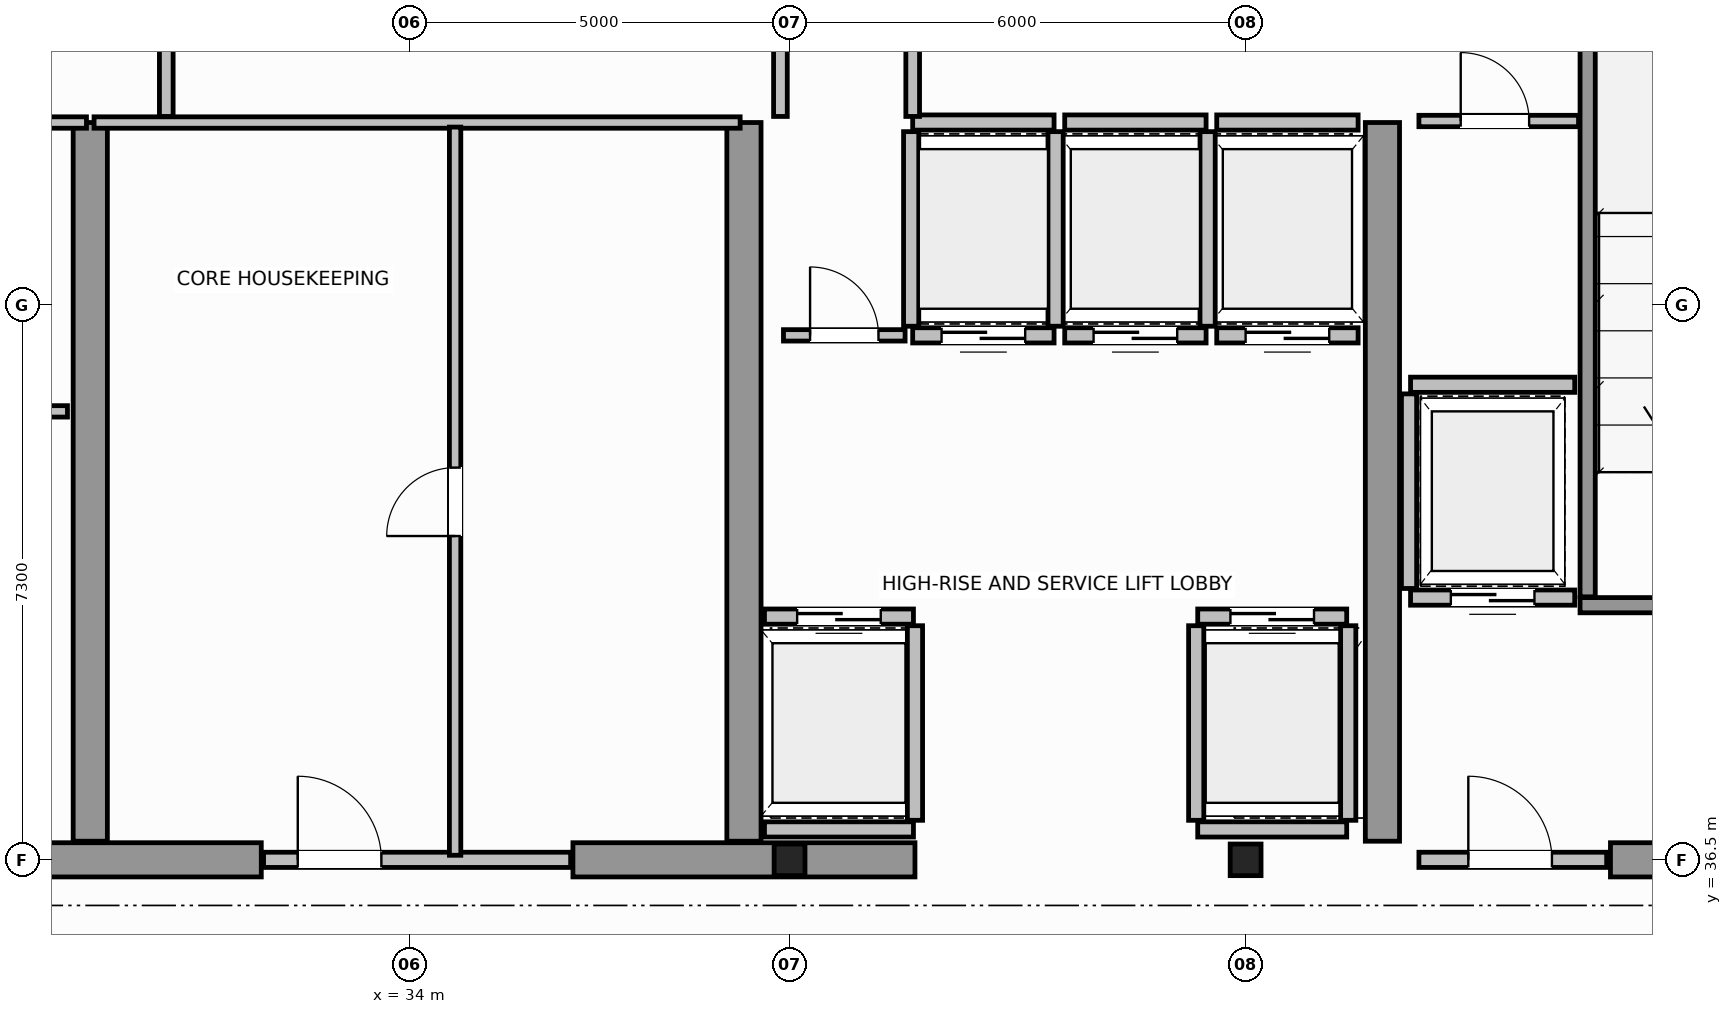
"""IFC4 building model, lengths in metres.
Left out: names, types, materials, properties, quantities, classifications, styles, units other than length and angle.
Written with IfcOpenShell. Run it as: python <this file> out.ifc"""

import sys

from ifc_helpers import new_model, si_unit, direction, frame, frame_2d, origin, origin_2d, place, context, subcontext, project, spatial, rectangle, i_section, extrude, source, transform, mapped, element, fill, save


model = new_model("IFC4")
c1 = context("Model", 3, precision=1e-05, world=origin(), true_north=direction((0.0, 1.0)))
c2 = subcontext(c1, "Body", "Model", "MODEL_VIEW")
j1 = project(units=[si_unit("LENGTHUNIT", "METRE"), si_unit("PLANEANGLEUNIT", "RADIAN")], contexts=[c1])
p1 = place(None, origin())
s1 = spatial("IfcSite", under=j1, at=p1, CompositionType="ELEMENT")
p2 = place(p1, origin())
s2 = spatial("IfcBuilding", under=s1, at=p2, CompositionType="ELEMENT")
p3 = place(p2, frame((0.0, 0.0, 291.6)))
s3 = spatial("IfcBuildingStorey", under=s2, at=p3, CompositionType="ELEMENT", Elevation=291.6)
m1 = source(origin(), c2, "Body", "SweptSolid", [
    extrude(i_section(OverallWidth=0.406, OverallDepth=0.416, WebThickness=0.03, FlangeThickness=0.042, FilletRadius=0.015, at=origin_2d()), origin(), (0.0, 0.0, 1.0), 3.8),
])
for number, where, z_axis, x_axis in (
    (1, (39.0, 36.5, 0.0), (0.0, 0.0, 1.0), (1.0, 0.0, 0.0)),
    (2, (45.0, 36.5, 0.0), (0.0, 0.0, 1.0), (1.0, 0.0, 0.0)),
):
    element("IfcColumn", number, at=place(p3, frame(where, z_axis=z_axis, x_axis=x_axis)), inside=s3, PredefinedType="COLUMN", context=c2, shape_type="MappedRepresentation", body=[
        mapped(m1, transform((0.0, 0.0, 0.0), scale=1.0)),
    ])
for number, where, z_axis, x_axis in (
    (3, (27.55, 36.5, 0.0), (0.0, 0.0, 1.0), (1.0, 0.0, 0.0)),
    (4, (36.15, 36.5, 0.0), (0.0, 0.0, 1.0), (1.0, 0.0, 0.0)),
):
    element("IfcWall", number, at=place(p3, frame(where, z_axis=z_axis, x_axis=x_axis)), inside=s3, PredefinedType="SHEAR", context=c2, shape_type="SweptSolid", body=[
        extrude(rectangle(XDim=4.5, YDim=0.45, at=frame_2d((2.25, 0.0))), origin(), (0.0, 0.0, 1.0), 3.8),
    ])
p4 = place(p3, frame((49.8, 36.5, 0.0), z_axis=(0.0, 0.0, 1.0), x_axis=(1.0, 0.0, 0.0)))
e5 = element("IfcWall", 5, at=p4, inside=s3, PredefinedType="SHEAR", context=c2, shape_type="SweptSolid", body=[
    extrude(rectangle(XDim=3.955, YDim=0.45, at=frame_2d((1.978, 0.0))), origin(), (0.0, 0.0, 1.0), 2.58),
])
for number, where, z_axis, x_axis in (
    (6, (29.8, 36.745, 0.0), (0.0, 0.0, 1.0), (0.0, 1.0, 0.0)),
    (7, (38.4, 36.745, 0.0), (0.0, 0.0, 1.0), (0.0, 1.0, 0.0)),
    (8, (46.8, 36.745, 0.0), (0.0, 0.0, 1.0), (0.0, 1.0, 0.0)),
):
    element("IfcWall", number, at=place(p3, frame(where, z_axis=z_axis, x_axis=x_axis)), inside=s3, PredefinedType="SHEAR", context=c2, shape_type="SweptSolid", body=[
        extrude(rectangle(XDim=9.455, YDim=0.45, at=frame_2d((4.728, 0.0))), origin(), (0.0, 0.0, 1.0), 3.8),
    ])
p5 = place(p3, frame((49.4, 39.85, 0.0), z_axis=(0.0, 0.0, 1.0), x_axis=(1.0, 0.0, 0.0)))
e9 = element("IfcWall", 9, at=p5, inside=s3, PredefinedType="SOLIDWALL", context=c2, shape_type="SweptSolid", body=[
    extrude(rectangle(XDim=4.375, YDim=0.2, at=frame_2d((2.188, 0.0))), origin(), (0.0, 0.0, 1.0), 3.8),
])
p6 = place(p5, frame((1.325, 0.0, 0.0)))
e10 = element("IfcOpeningElement", 10, at=p6, cuts=e9, PredefinedType="OPENING", context=c2, shape_type="SweptSolid", body=[
    extrude(rectangle(XDim=1.1, YDim=2.15, at=frame_2d((0.55, 1.075))), frame((0.0, 0.11, 0.0), z_axis=(0.0, -1.0, 0.0), x_axis=(1.0, 0.0, 0.0)), (0.0, 0.0, 1.0), 0.22),
])
p7 = place(p3, frame((49.5, 39.96, 0.0), z_axis=(0.0, 0.0, 1.0), x_axis=(0.0, 1.0, 0.0)))
e11 = element("IfcWall", 11, at=p7, inside=s3, PredefinedType="SOLIDWALL", context=c2, shape_type="SweptSolid", body=[
    extrude(rectangle(XDim=9.93, YDim=0.2, at=frame_2d((4.965, 0.0))), origin(), (0.0, 0.0, 1.0), 3.8),
])
p8 = place(p3, frame((47.28, 36.5, 0.0), z_axis=(0.0, 0.0, 1.0), x_axis=(1.0, 0.0, 0.0)))
e12 = element("IfcWall", 12, at=p8, inside=s3, PredefinedType="SOLIDWALL", context=c2, shape_type="SweptSolid", body=[
    extrude(rectangle(XDim=2.47, YDim=0.2, at=frame_2d((1.235, 0.0))), origin(), (0.0, 0.0, 1.0), 2.57),
])
p9 = place(p8, frame((0.65, 0.0, 0.0)))
e13 = element("IfcOpeningElement", 13, at=p9, cuts=e12, PredefinedType="OPENING", context=c2, shape_type="SweptSolid", body=[
    extrude(rectangle(XDim=1.1, YDim=2.15, at=frame_2d((0.55, 1.075))), frame((0.0, 0.11, 0.0), z_axis=(0.0, -1.0, 0.0), x_axis=(1.0, 0.0, 0.0)), (0.0, 0.0, 1.0), 0.22),
])
p10 = place(p3, frame((38.67, 39.7, 0.0), z_axis=(0.0, 0.0, 1.0), x_axis=(1.0, 0.0, 0.0)))
e14 = element("IfcWall", 14, at=p10, inside=s3, PredefinedType="SOLIDWALL", context=c2, shape_type="SweptSolid", body=[
    extrude(rectangle(XDim=1.96, YDim=0.2, at=frame_2d((0.98, 0.0))), origin(), (0.0, 0.0, 1.0), 3.58),
])
p11 = place(p10, frame((0.43, 0.0, 0.0)))
e15 = element("IfcOpeningElement", 15, at=p11, cuts=e14, PredefinedType="OPENING", context=c2, shape_type="SweptSolid", body=[
    extrude(rectangle(XDim=1.1, YDim=2.15, at=frame_2d((0.55, 1.075))), frame((0.0, 0.11, 0.0), z_axis=(0.0, -1.0, 0.0), x_axis=(1.0, 0.0, 0.0)), (0.0, 0.0, 1.0), 0.22),
])
p12 = place(p3, frame((38.67, 36.9, 0.0), z_axis=(0.0, 0.0, 1.0), x_axis=(1.0, 0.0, 0.0)))
e16 = element("IfcWall", 16, at=p12, inside=s3, PredefinedType="SOLIDWALL", context=c2, shape_type="SweptSolid", body=[
    extrude(rectangle(XDim=1.96, YDim=0.2, at=frame_2d((0.98, 0.0))), origin(), (0.0, 0.0, 1.0), 3.58),
])
p13 = place(p3, frame((40.65, 37.02, 0.0), z_axis=(0.0, 0.0, 1.0), x_axis=(0.0, 1.0, 0.0)))
e17 = element("IfcWall", 17, at=p13, inside=s3, PredefinedType="SOLIDWALL", context=c2, shape_type="SweptSolid", body=[
    extrude(rectangle(XDim=2.56, YDim=0.2, at=frame_2d((1.28, 0.0))), origin(), (0.0, 0.0, 1.0), 3.58),
])
p14 = place(p3, frame((44.37, 39.7, 0.0), z_axis=(0.0, 0.0, 1.0), x_axis=(1.0, 0.0, 0.0)))
e18 = element("IfcWall", 18, at=p14, inside=s3, PredefinedType="SOLIDWALL", context=c2, shape_type="SweptSolid", body=[
    extrude(rectangle(XDim=1.96, YDim=0.2, at=frame_2d((0.98, 0.0))), origin(), (0.0, 0.0, 1.0), 3.58),
])
p15 = place(p14, frame((0.43, 0.0, 0.0)))
e19 = element("IfcOpeningElement", 19, at=p15, cuts=e18, PredefinedType="OPENING", context=c2, shape_type="SweptSolid", body=[
    extrude(rectangle(XDim=1.1, YDim=2.15, at=frame_2d((0.55, 1.075))), frame((0.0, 0.11, 0.0), z_axis=(0.0, -1.0, 0.0), x_axis=(1.0, 0.0, 0.0)), (0.0, 0.0, 1.0), 0.22),
])
p16 = place(p3, frame((44.37, 36.9, 0.0), z_axis=(0.0, 0.0, 1.0), x_axis=(1.0, 0.0, 0.0)))
e20 = element("IfcWall", 20, at=p16, inside=s3, PredefinedType="SOLIDWALL", context=c2, shape_type="SweptSolid", body=[
    extrude(rectangle(XDim=1.96, YDim=0.2, at=frame_2d((0.98, 0.0))), origin(), (0.0, 0.0, 1.0), 2.57),
])
for number, where, z_axis, x_axis in (
    (21, (44.35, 37.02, 0.0), (0.0, 0.0, 1.0), (0.0, 1.0, 0.0)),
    (22, (46.35, 37.02, 0.0), (0.0, 0.0, 1.0), (0.0, 1.0, 0.0)),
):
    element("IfcWall", number, at=place(p3, frame(where, z_axis=z_axis, x_axis=x_axis)), inside=s3, PredefinedType="SOLIDWALL", context=c2, shape_type="SweptSolid", body=[
        extrude(rectangle(XDim=2.56, YDim=0.2, at=frame_2d((1.28, 0.0))), origin(), (0.0, 0.0, 1.0), 3.58),
    ])
p17 = place(p3, frame((40.62, 43.4, 0.0), z_axis=(0.0, 0.0, 1.0), x_axis=(1.0, 0.0, 0.0)))
e23 = element("IfcWall", 23, at=p17, inside=s3, PredefinedType="SOLIDWALL", context=c2, shape_type="SweptSolid", body=[
    extrude(rectangle(XDim=1.86, YDim=0.2, at=frame_2d((0.93, 0.0))), origin(), (0.0, 0.0, 1.0), 3.58),
])
p18 = place(p17, frame((0.38, 0.0, 0.0)))
e24 = element("IfcOpeningElement", 24, at=p18, cuts=e23, PredefinedType="OPENING", context=c2, shape_type="SweptSolid", body=[
    extrude(rectangle(XDim=1.1, YDim=2.15, at=frame_2d((0.55, 1.075))), frame((0.0, 0.11, 0.0), z_axis=(0.0, -1.0, 0.0), x_axis=(1.0, 0.0, 0.0)), (0.0, 0.0, 1.0), 0.22),
])
p19 = place(p3, frame((40.62, 46.2, 0.0), z_axis=(0.0, 0.0, 1.0), x_axis=(1.0, 0.0, 0.0)))
e25 = element("IfcWall", 25, at=p19, inside=s3, PredefinedType="SOLIDWALL", context=c2, shape_type="SweptSolid", body=[
    extrude(rectangle(XDim=1.86, YDim=0.2, at=frame_2d((0.93, 0.0))), origin(), (0.0, 0.0, 1.0), 3.58),
])
for number, where, z_axis, x_axis in (
    (26, (40.6, 43.52, 0.0), (0.0, 0.0, 1.0), (0.0, 1.0, 0.0)),
    (27, (42.5, 43.52, 0.0), (0.0, 0.0, 1.0), (0.0, 1.0, 0.0)),
):
    element("IfcWall", number, at=place(p3, frame(where, z_axis=z_axis, x_axis=x_axis)), inside=s3, PredefinedType="SOLIDWALL", context=c2, shape_type="SweptSolid", body=[
        extrude(rectangle(XDim=2.56, YDim=0.2, at=frame_2d((1.28, 0.0))), origin(), (0.0, 0.0, 1.0), 3.58),
    ])
p20 = place(p3, frame((42.62, 43.4, 0.0), z_axis=(0.0, 0.0, 1.0), x_axis=(1.0, 0.0, 0.0)))
e28 = element("IfcWall", 28, at=p20, inside=s3, PredefinedType="SOLIDWALL", context=c2, shape_type="SweptSolid", body=[
    extrude(rectangle(XDim=1.86, YDim=0.2, at=frame_2d((0.93, 0.0))), origin(), (0.0, 0.0, 1.0), 3.58),
])
p21 = place(p20, frame((0.38, 0.0, 0.0)))
e29 = element("IfcOpeningElement", 29, at=p21, cuts=e28, PredefinedType="OPENING", context=c2, shape_type="SweptSolid", body=[
    extrude(rectangle(XDim=1.1, YDim=2.15, at=frame_2d((0.55, 1.075))), frame((0.0, 0.11, 0.0), z_axis=(0.0, -1.0, 0.0), x_axis=(1.0, 0.0, 0.0)), (0.0, 0.0, 1.0), 0.22),
])
p22 = place(p3, frame((42.62, 46.2, 0.0), z_axis=(0.0, 0.0, 1.0), x_axis=(1.0, 0.0, 0.0)))
e30 = element("IfcWall", 30, at=p22, inside=s3, PredefinedType="SOLIDWALL", context=c2, shape_type="SweptSolid", body=[
    extrude(rectangle(XDim=1.86, YDim=0.2, at=frame_2d((0.93, 0.0))), origin(), (0.0, 0.0, 1.0), 3.58),
])
p23 = place(p3, frame((44.5, 43.52, 0.0), z_axis=(0.0, 0.0, 1.0), x_axis=(0.0, 1.0, 0.0)))
e31 = element("IfcWall", 31, at=p23, inside=s3, PredefinedType="SOLIDWALL", context=c2, shape_type="SweptSolid", body=[
    extrude(rectangle(XDim=2.56, YDim=0.2, at=frame_2d((1.28, 0.0))), origin(), (0.0, 0.0, 1.0), 3.58),
])
p24 = place(p3, frame((44.62, 43.4, 0.0), z_axis=(0.0, 0.0, 1.0), x_axis=(1.0, 0.0, 0.0)))
e32 = element("IfcWall", 32, at=p24, inside=s3, PredefinedType="SOLIDWALL", context=c2, shape_type="SweptSolid", body=[
    extrude(rectangle(XDim=1.86, YDim=0.2, at=frame_2d((0.93, 0.0))), origin(), (0.0, 0.0, 1.0), 3.58),
])
p25 = place(p24, frame((0.38, 0.0, 0.0)))
e33 = element("IfcOpeningElement", 33, at=p25, cuts=e32, PredefinedType="OPENING", context=c2, shape_type="SweptSolid", body=[
    extrude(rectangle(XDim=1.1, YDim=2.15, at=frame_2d((0.55, 1.075))), frame((0.0, 0.11, 0.0), z_axis=(0.0, -1.0, 0.0), x_axis=(1.0, 0.0, 0.0)), (0.0, 0.0, 1.0), 0.22),
])
p26 = place(p3, frame((44.62, 46.2, 0.0), z_axis=(0.0, 0.0, 1.0), x_axis=(1.0, 0.0, 0.0)))
e34 = element("IfcWall", 34, at=p26, inside=s3, PredefinedType="SOLIDWALL", context=c2, shape_type="SweptSolid", body=[
    extrude(rectangle(XDim=1.86, YDim=0.2, at=frame_2d((0.93, 0.0))), origin(), (0.0, 0.0, 1.0), 3.58),
])
p27 = place(p3, frame((47.17, 39.95, 0.0), z_axis=(0.0, 0.0, 1.0), x_axis=(1.0, 0.0, 0.0)))
e35 = element("IfcWall", 35, at=p27, inside=s3, PredefinedType="SOLIDWALL", context=c2, shape_type="SweptSolid", body=[
    extrude(rectangle(XDim=2.16, YDim=0.2, at=frame_2d((1.08, 0.0))), origin(), (0.0, 0.0, 1.0), 3.58),
])
p28 = place(p27, frame((0.53, 0.0, 0.0)))
e36 = element("IfcOpeningElement", 36, at=p28, cuts=e35, PredefinedType="OPENING", context=c2, shape_type="SweptSolid", body=[
    extrude(rectangle(XDim=1.1, YDim=2.15, at=frame_2d((0.55, 1.075))), frame((0.0, 0.11, 0.0), z_axis=(0.0, -1.0, 0.0), x_axis=(1.0, 0.0, 0.0)), (0.0, 0.0, 1.0), 0.22),
])
p29 = place(p3, frame((47.17, 42.75, 0.0), z_axis=(0.0, 0.0, 1.0), x_axis=(1.0, 0.0, 0.0)))
e37 = element("IfcWall", 37, at=p29, inside=s3, PredefinedType="SOLIDWALL", context=c2, shape_type="SweptSolid", body=[
    extrude(rectangle(XDim=2.16, YDim=0.2, at=frame_2d((1.08, 0.0))), origin(), (0.0, 0.0, 1.0), 3.58),
])
p30 = place(p3, frame((47.15, 40.07, 0.0), z_axis=(0.0, 0.0, 1.0), x_axis=(0.0, 1.0, 0.0)))
e38 = element("IfcWall", 38, at=p30, inside=s3, PredefinedType="SOLIDWALL", context=c2, shape_type="SweptSolid", body=[
    extrude(rectangle(XDim=2.56, YDim=0.2, at=frame_2d((1.28, 0.0))), origin(), (0.0, 0.0, 1.0), 3.58),
])
p31 = place(p3, frame((21.25, 46.2, 0.0), z_axis=(0.0, 0.0, 1.0), x_axis=(1.0, 0.0, 0.0)))
e39 = element("IfcWall", 39, at=p31, inside=s3, PredefinedType="PARTITIONING", context=c2, shape_type="SweptSolid", body=[
    extrude(rectangle(XDim=8.5, YDim=0.15, at=frame_2d((4.25, 0.0))), origin(), (0.0, 0.0, 1.0), 3.58),
])
p32 = place(p3, frame((21.5, 42.4, 0.0), z_axis=(0.0, 0.0, 1.0), x_axis=(1.0, 0.0, 0.0)))
e40 = element("IfcWall", 40, at=p32, inside=s3, PredefinedType="PARTITIONING", context=c2, shape_type="SweptSolid", body=[
    extrude(rectangle(XDim=8.0, YDim=0.15, at=frame_2d((4.0, 0.0))), origin(), (0.0, 0.0, 1.0), 3.58),
])
p33 = place(p32, frame((3.4, 0.0, 0.0)))
e41 = element("IfcOpeningElement", 41, at=p33, cuts=e40, PredefinedType="OPENING", context=c2, shape_type="SweptSolid", body=[
    extrude(rectangle(XDim=0.9, YDim=2.1, at=frame_2d((0.45, 1.05))), frame((0.0, 0.085, 0.0), z_axis=(0.0, -1.0, 0.0), x_axis=(1.0, 0.0, 0.0)), (0.0, 0.0, 1.0), 0.17),
])
p34 = place(p3, frame((32.08, 36.5, 0.0), z_axis=(0.0, 0.0, 1.0), x_axis=(1.0, 0.0, 0.0)))
e42 = element("IfcWall", 42, at=p34, inside=s3, PredefinedType="SOLIDWALL", context=c2, shape_type="SweptSolid", body=[
    extrude(rectangle(XDim=4.04, YDim=0.2, at=frame_2d((2.02, 0.0))), origin(), (0.0, 0.0, 1.0), 3.12),
])
p35 = place(p34, frame((0.45, 0.0, 0.0)))
e43 = element("IfcOpeningElement", 43, at=p35, cuts=e42, PredefinedType="OPENING", context=c2, shape_type="SweptSolid", body=[
    extrude(rectangle(XDim=1.1, YDim=2.15, at=frame_2d((0.55, 1.075))), frame((0.0, 0.11, 0.0), z_axis=(0.0, -1.0, 0.0), x_axis=(1.0, 0.0, 0.0)), (0.0, 0.0, 1.0), 0.22),
])
p36 = place(p3, frame((29.85, 46.2, 0.0), z_axis=(0.0, 0.0, 1.0), x_axis=(1.0, 0.0, 0.0)))
e44 = element("IfcWall", 44, at=p36, inside=s3, PredefinedType="PARTITIONING", context=c2, shape_type="SweptSolid", body=[
    extrude(rectangle(XDim=8.5, YDim=0.15, at=frame_2d((4.25, 0.0))), origin(), (0.0, 0.0, 1.0), 3.58),
])
p37 = place(p3, frame((34.6, 36.56, 0.0), z_axis=(0.0, 0.0, 1.0), x_axis=(0.0, 1.0, 0.0)))
e45 = element("IfcWall", 45, at=p37, inside=s3, PredefinedType="PARTITIONING", context=c2, shape_type="SweptSolid", body=[
    extrude(rectangle(XDim=9.58, YDim=0.15, at=frame_2d((4.79, 0.0))), origin(), (0.0, 0.0, 1.0), 3.58),
])
p38 = place(p37, frame((4.2, 0.0, 0.0)))
e46 = element("IfcOpeningElement", 46, at=p38, cuts=e45, PredefinedType="OPENING", context=c2, shape_type="SweptSolid", body=[
    extrude(rectangle(XDim=0.9, YDim=2.1, at=frame_2d((0.45, 1.05))), frame((0.0, 0.085, 0.0), z_axis=(0.0, -1.0, 0.0), x_axis=(1.0, 0.0, 0.0)), (0.0, 0.0, 1.0), 0.17),
])
p39 = place(p3, frame((47.28, 46.22, 0.0), z_axis=(0.0, 0.0, 1.0), x_axis=(1.0, 0.0, 0.0)))
e47 = element("IfcWall", 47, at=p39, inside=s3, PredefinedType="PARTITIONING", context=c2, shape_type="SweptSolid", body=[
    extrude(rectangle(XDim=2.1, YDim=0.15, at=frame_2d((1.05, 0.0))), origin(), (0.0, 0.0, 1.0), 3.58),
])
p40 = place(p39, frame((0.55, 0.0, 0.0)))
e48 = element("IfcOpeningElement", 48, at=p40, cuts=e47, PredefinedType="OPENING", context=c2, shape_type="SweptSolid", body=[
    extrude(rectangle(XDim=0.9, YDim=2.1, at=frame_2d((0.45, 1.05))), frame((0.0, 0.085, 0.0), z_axis=(0.0, -1.0, 0.0), x_axis=(1.0, 0.0, 0.0)), (0.0, 0.0, 1.0), 0.17),
])
p41 = place(p3, frame((38.92, 43.4, 0.0), z_axis=(0.0, 0.0, 1.0), x_axis=(1.0, 0.0, 0.0)))
e49 = element("IfcWall", 49, at=p41, inside=s3, PredefinedType="PARTITIONING", context=c2, shape_type="SweptSolid", body=[
    extrude(rectangle(XDim=1.6, YDim=0.15, at=frame_2d((0.8, 0.0))), origin(), (0.0, 0.0, 1.0), 3.58),
])
p42 = place(p41, frame((0.35, 0.0, 0.0)))
e50 = element("IfcOpeningElement", 50, at=p42, cuts=e49, PredefinedType="OPENING", context=c2, shape_type="SweptSolid", body=[
    extrude(rectangle(XDim=0.9, YDim=2.1, at=frame_2d((0.45, 1.05))), frame((0.0, 0.085, 0.0), z_axis=(0.0, -1.0, 0.0), x_axis=(1.0, 0.0, 0.0)), (0.0, 0.0, 1.0), 0.17),
])
for number, where, z_axis, x_axis in (
    (51, (30.8, 46.28, 0.0), (0.0, 0.0, 1.0), (0.0, 1.0, 0.0)),
    (52, (38.88, 46.28, 0.0), (0.0, 0.0, 1.0), (0.0, 1.0, 0.0)),
):
    element("IfcWall", number, at=place(p3, frame(where, z_axis=z_axis, x_axis=x_axis)), inside=s3, PredefinedType="PLUMBINGWALL", context=c2, shape_type="SweptSolid", body=[
        extrude(rectangle(XDim=1.94, YDim=0.18, at=frame_2d((0.97, 0.0))), origin(), (0.0, 0.0, 1.0), 3.58),
    ])
p43 = place(p3, frame((40.62, 46.28, 0.0), z_axis=(0.0, 0.0, 1.0), x_axis=(0.0, 1.0, 0.0)))
e53 = element("IfcWall", 53, at=p43, inside=s3, PredefinedType="PLUMBINGWALL", context=c2, shape_type="SweptSolid", body=[
    extrude(rectangle(XDim=2.0, YDim=0.18, at=frame_2d((1.0, 0.0))), origin(), (0.0, 0.0, 1.0), 3.58),
])
m2 = source(origin(), c2, "Body", "SweptSolid", [
    extrude(rectangle(XDim=1.1, YDim=2.15, at=frame_2d((0.55, 1.075))), frame((0.0, 0.025, 0.0), z_axis=(0.0, -1.0, 0.0), x_axis=(1.0, 0.0, 0.0)), (0.0, 0.0, 1.0), 0.05),
])
p44 = place(p9, origin())
e54 = element("IfcDoor", 54, at=p44, inside=s3, OperationType="SINGLE_SWING_LEFT", PredefinedType="DOOR", context=c2, shape_type="MappedRepresentation", body=[
    mapped(m2, transform((0.0, 0.0, 0.0), scale=1.0)),
])
fill(e13, e54)
p45 = place(p11, origin())
e55 = element("IfcDoor", 55, at=p45, inside=s3, OperationType="DOUBLE_DOOR_SLIDING", PredefinedType="DOOR", context=c2, shape_type="MappedRepresentation", body=[
    mapped(m2, transform((0.0, 0.0, 0.0), scale=1.0)),
])
fill(e15, e55)
p46 = place(p15, origin())
e56 = element("IfcDoor", 56, at=p46, inside=s3, OperationType="DOUBLE_DOOR_SLIDING", PredefinedType="DOOR", context=c2, shape_type="MappedRepresentation", body=[
    mapped(m2, transform((0.0, 0.0, 0.0), scale=1.0)),
])
fill(e19, e56)
p47 = place(p18, origin())
e57 = element("IfcDoor", 57, at=p47, inside=s3, OperationType="DOUBLE_DOOR_SLIDING", PredefinedType="DOOR", context=c2, shape_type="MappedRepresentation", body=[
    mapped(m2, transform((0.0, 0.0, 0.0), scale=1.0)),
])
fill(e24, e57)
p48 = place(p21, origin())
e58 = element("IfcDoor", 58, at=p48, inside=s3, OperationType="DOUBLE_DOOR_SLIDING", PredefinedType="DOOR", context=c2, shape_type="MappedRepresentation", body=[
    mapped(m2, transform((0.0, 0.0, 0.0), scale=1.0)),
])
fill(e29, e58)
p49 = place(p25, origin())
e59 = element("IfcDoor", 59, at=p49, inside=s3, OperationType="DOUBLE_DOOR_SLIDING", PredefinedType="DOOR", context=c2, shape_type="MappedRepresentation", body=[
    mapped(m2, transform((0.0, 0.0, 0.0), scale=1.0)),
])
fill(e33, e59)
p50 = place(p28, origin())
e60 = element("IfcDoor", 60, at=p50, inside=s3, OperationType="DOUBLE_DOOR_SLIDING", PredefinedType="DOOR", context=c2, shape_type="MappedRepresentation", body=[
    mapped(m2, transform((0.0, 0.0, 0.0), scale=1.0)),
])
fill(e36, e60)
p51 = place(p35, origin())
e61 = element("IfcDoor", 61, at=p51, inside=s3, OperationType="SINGLE_SWING_LEFT", PredefinedType="DOOR", context=c2, shape_type="MappedRepresentation", body=[
    mapped(m2, transform((0.0, 0.0, 0.0), scale=1.0)),
])
fill(e43, e61)
m3 = source(origin(), c2, "Body", "SweptSolid", [
    extrude(rectangle(XDim=0.9, YDim=2.1, at=frame_2d((0.45, 1.05))), frame((0.0, 0.025, 0.0), z_axis=(0.0, -1.0, 0.0), x_axis=(1.0, 0.0, 0.0)), (0.0, 0.0, 1.0), 0.05),
])
p52 = place(p38, origin())
e62 = element("IfcDoor", 62, at=p52, inside=s3, OperationType="SINGLE_SWING_RIGHT", PredefinedType="DOOR", context=c2, shape_type="MappedRepresentation", body=[
    mapped(m3, transform((0.0, 0.0, 0.0), scale=1.0)),
])
fill(e46, e62)
p53 = place(p40, origin())
e63 = element("IfcDoor", 63, at=p53, inside=s3, OperationType="SINGLE_SWING_RIGHT", PredefinedType="DOOR", context=c2, shape_type="MappedRepresentation", body=[
    mapped(m3, transform((0.0, 0.0, 0.0), scale=1.0)),
])
fill(e48, e63)
p54 = place(p42, origin())
e64 = element("IfcDoor", 64, at=p54, inside=s3, OperationType="SINGLE_SWING_LEFT", PredefinedType="DOOR", context=c2, shape_type="MappedRepresentation", body=[
    mapped(m3, transform((0.0, 0.0, 0.0), scale=1.0)),
])
fill(e50, e64)
save(model, sys.argv[1])
